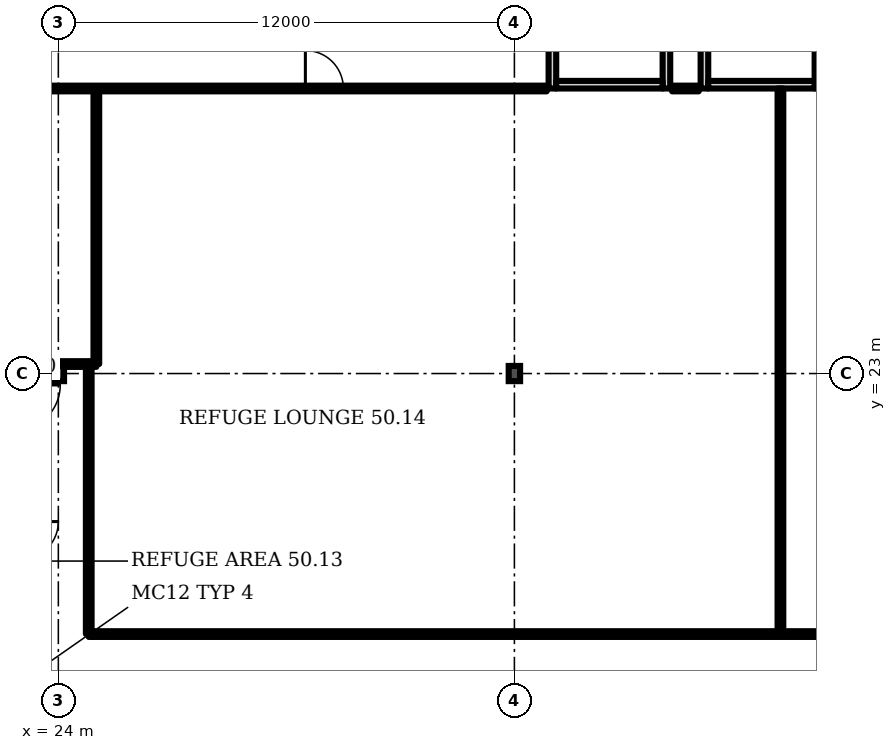
"""IFC4 building model, lengths in metres.
Left out: names, types, materials, properties, quantities, classifications, styles, units other than length and angle.
Written with IfcOpenShell. Run it as: python <this file> out.ifc"""

import sys

from ifc_helpers import new_model, si_unit, direction, frame, frame_2d, origin, origin_2d, place, context, subcontext, project, spatial, rectangle, i_section, extrude, element, fill, save


model = new_model("IFC4")
c1 = context("Model", 3, precision=1e-05, world=origin(), true_north=direction((0.0, 1.0)))
c2 = subcontext(c1, "Body", "Model", "MODEL_VIEW")
j1 = project(units=[si_unit("LENGTHUNIT", "METRE"), si_unit("PLANEANGLEUNIT", "RADIAN")], contexts=[c1])
p1 = place(None, origin())
s1 = spatial("IfcSite", under=j1, at=p1, CompositionType="ELEMENT")
p2 = place(p1, origin())
s2 = spatial("IfcBuilding", under=s1, at=p2, CompositionType="ELEMENT")
p3 = place(p2, frame((0.0, 0.0, 202.3)))
s3 = spatial("IfcBuildingStorey", under=s2, at=p3, CompositionType="ELEMENT", Elevation=202.3)
for number, where, z_axis, x_axis in (
    (1, (24.0, 23.0, 0.0), (0.0, 0.0, 1.0), (1.0, 0.0, 0.0)),
    (2, (36.0, 23.0, 0.0), (0.0, 0.0, 1.0), (1.0, 0.0, 0.0)),
):
    element("IfcColumn", number, at=place(p3, frame(where, z_axis=z_axis, x_axis=x_axis)), inside=s3, PredefinedType="COLUMN", context=c2, shape_type="SweptSolid", body=[
        extrude(i_section(OverallWidth=0.3, OverallDepth=0.4, WebThickness=0.013, FlangeThickness=0.024, FilletRadius=0.027, at=origin_2d()), origin(), (0.0, 0.0, 1.0), 4.8),
    ])
p4 = place(p3, frame((37.0, 30.5, 0.0), z_axis=(0.0, 0.0, 1.0), x_axis=(0.0, 1.0, 0.0)))
e3 = element("IfcWall", 3, at=p4, inside=s3, PredefinedType="PARTITIONING", context=c2, shape_type="SweptSolid", body=[
    extrude(rectangle(XDim=3.5, YDim=0.2, at=frame_2d((1.75, 0.0))), origin(), (0.0, 0.0, 1.0), 4.4),
])
p5 = place(p4, frame((1.2, 0.0, 0.0)))
e4 = element("IfcOpeningElement", 4, at=p5, cuts=e3, PredefinedType="OPENING", context=c2, shape_type="SweptSolid", body=[
    extrude(rectangle(XDim=1.1, YDim=2.1, at=frame_2d((0.55, 1.05))), frame((0.0, 0.11, 0.0), z_axis=(0.0, -1.0, 0.0), x_axis=(1.0, 0.0, 0.0)), (0.0, 0.0, 1.0), 0.22),
])
p6 = place(p3, frame((40.0, 30.5, 0.0), z_axis=(0.0, 0.0, 1.0), x_axis=(0.0, 1.0, 0.0)))
e5 = element("IfcWall", 5, at=p6, inside=s3, PredefinedType="PARTITIONING", context=c2, shape_type="SweptSolid", body=[
    extrude(rectangle(XDim=3.5, YDim=0.2, at=frame_2d((1.75, 0.0))), origin(), (0.0, 0.0, 1.0), 4.4),
])
p7 = place(p3, frame((37.1, 30.6, 0.0), z_axis=(0.0, 0.0, 1.0), x_axis=(1.0, 0.0, 0.0)))
e6 = element("IfcWall", 6, at=p7, inside=s3, PredefinedType="PARTITIONING", context=c2, shape_type="SweptSolid", body=[
    extrude(rectangle(XDim=2.8, YDim=0.2, at=frame_2d((1.4, 0.0))), origin(), (0.0, 0.0, 1.0), 4.4),
])
p8 = place(p3, frame((41.0, 30.5, 0.0), z_axis=(0.0, 0.0, 1.0), x_axis=(0.0, 1.0, 0.0)))
e7 = element("IfcWall", 7, at=p8, inside=s3, PredefinedType="PARTITIONING", context=c2, shape_type="SweptSolid", body=[
    extrude(rectangle(XDim=3.5, YDim=0.2, at=frame_2d((1.75, 0.0))), origin(), (0.0, 0.0, 1.0), 4.4),
])
p9 = place(p3, frame((44.0, 30.5, 0.0), z_axis=(0.0, 0.0, 1.0), x_axis=(0.0, 1.0, 0.0)))
e8 = element("IfcWall", 8, at=p9, inside=s3, PredefinedType="PARTITIONING", context=c2, shape_type="SweptSolid", body=[
    extrude(rectangle(XDim=3.5, YDim=0.2, at=frame_2d((1.75, 0.0))), origin(), (0.0, 0.0, 1.0), 4.4),
])
p10 = place(p9, frame((1.2, 0.0, 0.0)))
e9 = element("IfcOpeningElement", 9, at=p10, cuts=e8, PredefinedType="OPENING", context=c2, shape_type="SweptSolid", body=[
    extrude(rectangle(XDim=1.1, YDim=2.1, at=frame_2d((0.55, 1.05))), frame((0.0, 0.11, 0.0), z_axis=(0.0, -1.0, 0.0), x_axis=(1.0, 0.0, 0.0)), (0.0, 0.0, 1.0), 0.22),
])
p11 = place(p3, frame((41.1, 30.6, 0.0), z_axis=(0.0, 0.0, 1.0), x_axis=(1.0, 0.0, 0.0)))
e10 = element("IfcWall", 10, at=p11, inside=s3, PredefinedType="PARTITIONING", context=c2, shape_type="SweptSolid", body=[
    extrude(rectangle(XDim=2.8, YDim=0.2, at=frame_2d((1.4, 0.0))), origin(), (0.0, 0.0, 1.0), 4.4),
])
p12 = place(p3, frame((16.0, 30.5, 0.0), z_axis=(0.0, 0.0, 1.0), x_axis=(1.0, 0.0, 0.0)))
e11 = element("IfcWall", 11, at=p12, inside=s3, PredefinedType="PARTITIONING", context=c2, shape_type="SweptSolid", body=[
    extrude(rectangle(XDim=20.85, YDim=0.15, at=frame_2d((10.425, 0.0))), origin(), (0.0, 0.0, 1.0), 4.4),
])
p13 = place(p12, frame((0.12, 0.0, 0.0)))
e12 = element("IfcOpeningElement", 12, at=p13, cuts=e11, PredefinedType="OPENING", context=c2, shape_type="SweptSolid", body=[
    extrude(rectangle(XDim=1.0, YDim=2.1, at=frame_2d((0.5, 1.05))), frame((0.0, 0.085, 0.0), z_axis=(0.0, -1.0, 0.0), x_axis=(1.0, 0.0, 0.0)), (0.0, 0.0, 1.0), 0.17),
])
p14 = place(p12, frame((5.42, 0.0, 0.0)))
e13 = element("IfcOpeningElement", 13, at=p14, cuts=e11, PredefinedType="OPENING", context=c2, shape_type="SweptSolid", body=[
    extrude(rectangle(XDim=1.0, YDim=2.1, at=frame_2d((0.5, 1.05))), frame((0.0, 0.085, 0.0), z_axis=(0.0, -1.0, 0.0), x_axis=(1.0, 0.0, 0.0)), (0.0, 0.0, 1.0), 0.17),
])
p15 = place(p12, frame((14.5, 0.0, 0.0)))
e14 = element("IfcOpeningElement", 14, at=p15, cuts=e11, PredefinedType="OPENING", context=c2, shape_type="SweptSolid", body=[
    extrude(rectangle(XDim=1.0, YDim=2.1, at=frame_2d((0.5, 1.05))), frame((0.0, 0.085, 0.0), z_axis=(0.0, -1.0, 0.0), x_axis=(1.0, 0.0, 0.0)), (0.0, 0.0, 1.0), 0.17),
])
p16 = place(p3, frame((23.02, 23.25, 0.0), z_axis=(0.0, 0.0, 1.0), x_axis=(1.0, 0.0, 0.0)))
e15 = element("IfcWall", 15, at=p16, inside=s3, PredefinedType="PARTITIONING", context=c2, shape_type="SweptSolid", body=[
    extrude(rectangle(XDim=1.98, YDim=0.15, at=frame_2d((0.99, 0.0))), origin(), (0.0, 0.0, 1.0), 4.4),
])
p17 = place(p3, frame((24.8, 16.145, 0.0), z_axis=(0.0, 0.0, 1.0), x_axis=(0.0, 1.0, 0.0)))
e16 = element("IfcWall", 16, at=p17, inside=s3, PredefinedType="PARTITIONING", context=c2, shape_type="SweptSolid", body=[
    extrude(rectangle(XDim=7.105, YDim=0.15, at=frame_2d((3.552, 0.0))), origin(), (0.0, 0.0, 1.0), 4.4),
])
p18 = place(p3, frame((24.8, 16.145, 0.0), z_axis=(0.0, 0.0, 1.0), x_axis=(1.0, 0.0, 0.0)))
e17 = element("IfcWall", 17, at=p18, inside=s3, PredefinedType="PARTITIONING", context=c2, shape_type="SweptSolid", body=[
    extrude(rectangle(XDim=37.305, YDim=0.15, at=frame_2d((18.652, 0.0))), origin(), (0.0, 0.0, 1.0), 4.4),
])
p19 = place(p18, frame((23.78, 0.0, 0.0)))
e18 = element("IfcOpeningElement", 18, at=p19, cuts=e17, PredefinedType="OPENING", context=c2, shape_type="SweptSolid", body=[
    extrude(rectangle(XDim=1.0, YDim=2.1, at=frame_2d((0.5, 1.05))), frame((0.0, 0.085, 0.0), z_axis=(0.0, -1.0, 0.0), x_axis=(1.0, 0.0, 0.0)), (0.0, 0.0, 1.0), 0.17),
])
p20 = place(p18, frame((33.705, 0.0, 0.0)))
e19 = element("IfcOpeningElement", 19, at=p20, cuts=e17, PredefinedType="OPENING", context=c2, shape_type="SweptSolid", body=[
    extrude(rectangle(XDim=1.0, YDim=2.1, at=frame_2d((0.5, 1.05))), frame((0.0, 0.085, 0.0), z_axis=(0.0, -1.0, 0.0), x_axis=(1.0, 0.0, 0.0)), (0.0, 0.0, 1.0), 0.17),
])
p21 = place(p3, frame((25.0, 23.25, 0.0), z_axis=(0.0, 0.0, 1.0), x_axis=(0.0, 1.0, 0.0)))
e20 = element("IfcWall", 20, at=p21, inside=s3, PredefinedType="PARTITIONING", context=c2, shape_type="SweptSolid", body=[
    extrude(rectangle(XDim=7.25, YDim=0.15, at=frame_2d((3.625, 0.0))), origin(), (0.0, 0.0, 1.0), 4.4),
])
p22 = place(p3, frame((43.0, 16.145, 0.0), z_axis=(0.0, 0.0, 1.0), x_axis=(0.0, 1.0, 0.0)))
e21 = element("IfcWall", 21, at=p22, inside=s3, PredefinedType="PARTITIONING", context=c2, shape_type="SweptSolid", body=[
    extrude(rectangle(XDim=14.355, YDim=0.15, at=frame_2d((7.177, 0.0))), origin(), (0.0, 0.0, 1.0), 4.4),
])
p23 = place(p3, frame((40.15, 30.5, 0.0), z_axis=(0.0, 0.0, 1.0), x_axis=(1.0, 0.0, 0.0)))
e22 = element("IfcWall", 22, at=p23, inside=s3, PredefinedType="PARTITIONING", context=c2, shape_type="SweptSolid", body=[
    extrude(rectangle(XDim=0.7, YDim=0.15, at=frame_2d((0.35, 0.0))), origin(), (0.0, 0.0, 1.0), 4.4),
])
p24 = place(p15, origin())
e23 = element("IfcDoor", 23, at=p24, inside=s3, OperationType="SINGLE_SWING_LEFT", PredefinedType="DOOR", context=c2, shape_type="SweptSolid", body=[
    extrude(rectangle(XDim=1.0, YDim=2.1, at=frame_2d((0.5, 1.05))), frame((0.0, 0.025, 0.0), z_axis=(0.0, -1.0, 0.0), x_axis=(1.0, 0.0, 0.0)), (0.0, 0.0, 1.0), 0.05),
])
fill(e14, e23)
save(model, sys.argv[1])
